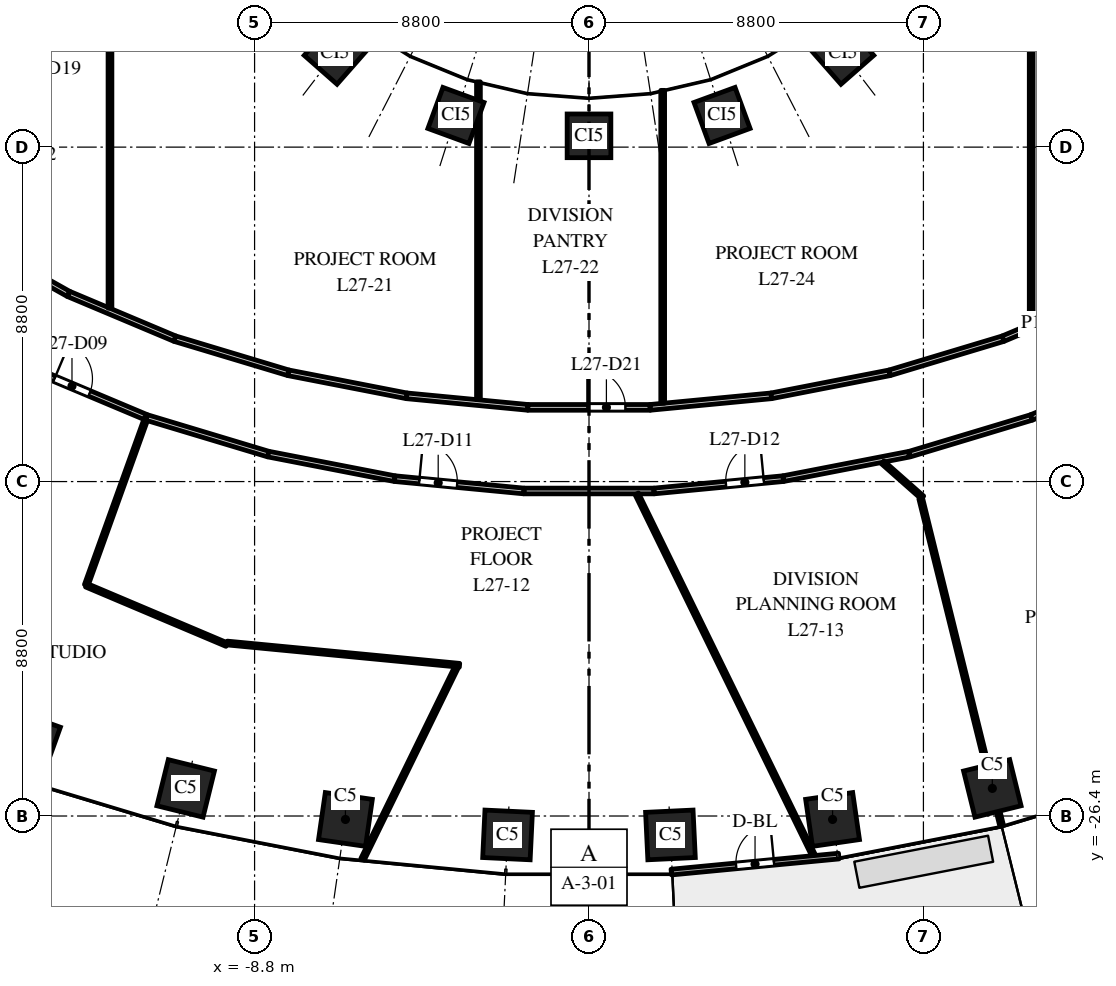
"""IFC4 building model, lengths in metres.
Left out: names, types, materials, properties, quantities, classifications, styles, units other than length and angle.
Written with IfcOpenShell. Run it as: python <this file> out.ifc"""

import sys

from ifc_helpers import new_model, si_unit, direction, frame, frame_2d, origin, origin_2d, place, context, subcontext, project, spatial, rectangle, extrude, element, fill, save


model = new_model("IFC4")
c1 = context("Model", 3, precision=1e-05, world=origin(), true_north=direction((0.0, 1.0)))
c2 = subcontext(c1, "Body", "Model", "MODEL_VIEW")
j1 = project(units=[si_unit("LENGTHUNIT", "METRE"), si_unit("PLANEANGLEUNIT", "RADIAN")], contexts=[c1])
p1 = place(None, origin())
s1 = spatial("IfcSite", under=j1, at=p1, CompositionType="ELEMENT")
p2 = place(p1, origin())
s2 = spatial("IfcBuilding", under=s1, at=p2, CompositionType="ELEMENT")
p3 = place(p2, frame((0.0, 0.0, 120.0)))
s3 = spatial("IfcBuildingStorey", under=s2, at=p3, CompositionType="ELEMENT", Elevation=120.0)
for number, where, z_axis, x_axis in (
    (1, (-14.709, -24.441, 0.0), (0.0, 0.0, 1.0), (0.941, -0.338, 0.0)),
    (2, (-10.613, -25.674, 0.0), (0.0, 0.0, 1.0), (0.971, -0.24, 0.0)),
    (3, (-6.409, -26.491, 0.0), (0.0, 0.0, 1.0), (0.99, -0.143, 0.0)),
    (4, (-2.143, -26.898, 0.0), (0.0, 0.0, 1.0), (0.999, -0.048, 0.0)),
    (5, (2.143, -26.898, 0.0), (0.0, 0.0, 1.0), (0.999, 0.048, 0.0)),
    (6, (6.409, -26.491, 0.0), (0.0, 0.0, 1.0), (0.99, 0.143, 0.0)),
    (7, (10.613, -25.674, 0.0), (0.0, 0.0, 1.0), (0.971, 0.24, 0.0)),
):
    element("IfcColumn", number, at=place(p3, frame(where, z_axis=z_axis, x_axis=x_axis)), inside=s3, PredefinedType="COLUMN", context=c2, shape_type="SweptSolid", body=[
        extrude(rectangle(XDim=1.25, YDim=1.25, at=origin_2d()), origin(), (0.0, 0.0, 1.0), 4.0),
    ])
for number, where, z_axis, x_axis in (
    (8, (-6.682, -6.334, 0.0), (0.0, 0.0, 1.0), (0.751, -0.66, 0.0)),
    (9, (-3.501, -7.967, 0.0), (0.0, 0.0, 1.0), (0.939, -0.344, 0.0)),
    (10, (0.0, -8.503, 0.0), (0.0, 0.0, 1.0), (1.0, 0.0, 0.0)),
    (11, (3.501, -7.967, 0.0), (0.0, 0.0, 1.0), (0.939, 0.344, 0.0)),
    (12, (6.682, -6.334, 0.0), (0.0, 0.0, 1.0), (0.751, 0.66, 0.0)),
):
    element("IfcColumn", number, at=place(p3, frame(where, z_axis=z_axis, x_axis=x_axis)), inside=s3, PredefinedType="COLUMN", context=c2, shape_type="SweptSolid", body=[
        extrude(rectangle(XDim=1.15, YDim=1.15, at=origin_2d()), origin(), (0.0, 0.0, 1.0), 4.0),
    ])
p4 = place(p3, frame((2.166, -27.875, 0.0), z_axis=(0.0, 0.0, 1.0), x_axis=(0.995473879823, 0.095035543824, 0.0)))
e13 = element("IfcWall", 13, at=p4, inside=s3, PredefinedType="STANDARD", context=c2, shape_type="SweptSolid", body=[
    extrude(rectangle(XDim=4.426, YDim=0.15, at=frame_2d((2.213, 0.0))), origin(), (0.0, 0.0, 1.0), 3.7),
])
p5 = place(p4, frame((1.713, 0.0, 0.0)))
e14 = element("IfcOpeningElement", 14, at=p5, cuts=e13, PredefinedType="OPENING", context=c2, shape_type="SweptSolid", body=[
    extrude(rectangle(XDim=1.0, YDim=2.4, at=frame_2d((0.5, 1.2))), frame((0.0, 0.085, 0.0), z_axis=(0.0, -1.0, 0.0), x_axis=(1.0, 0.0, 0.0)), (0.0, 0.0, 1.0), 0.17),
])
p6 = place(p3, frame((-16.25, -11.23, 0.0), z_axis=(0.0, 0.0, 1.0), x_axis=(0.872147381065, -0.489243237767, 0.0)))
e15 = element("IfcWall", 15, at=p6, inside=s3, PredefinedType="PARTITIONING", context=c2, shape_type="SweptSolid", body=[
    extrude(rectangle(XDim=2.927, YDim=0.15, at=frame_2d((1.464, 0.0))), origin(), (0.0, 0.0, 1.0), 2.75),
])
p7 = place(p3, frame((-14.665, -14.642, 0.0), z_axis=(0.0, 0.0, 1.0), x_axis=(0.921850993012, -0.387544509293, 0.0)))
e16 = element("IfcWall", 16, at=p7, inside=s3, PredefinedType="PARTITIONING", context=c2, shape_type="SweptSolid", body=[
    extrude(rectangle(XDim=3.259, YDim=0.15, at=frame_2d((1.629, 0.0))), origin(), (0.0, 0.0, 1.0), 2.85),
])
p8 = place(p7, frame((0.65, 0.0, 0.0)))
e17 = element("IfcOpeningElement", 17, at=p8, cuts=e16, PredefinedType="OPENING", context=c2, shape_type="SweptSolid", body=[
    extrude(rectangle(XDim=1.0, YDim=2.1, at=frame_2d((0.5, 1.05))), frame((0.0, 0.085, 0.0), z_axis=(0.0, -1.0, 0.0), x_axis=(1.0, 0.0, 0.0)), (0.0, 0.0, 1.0), 0.17),
])
p9 = place(p3, frame((-13.697, -12.662, 0.0), z_axis=(0.0, 0.0, 1.0), x_axis=(0.921751821358, -0.387780324183, 0.0)))
e18 = element("IfcWall", 18, at=p9, inside=s3, PredefinedType="PARTITIONING", context=c2, shape_type="SweptSolid", body=[
    extrude(rectangle(XDim=3.038, YDim=0.15, at=frame_2d((1.519, 0.0))), origin(), (0.0, 0.0, 1.0), 2.85),
])
p10 = place(p3, frame((-13.23, -20.327, 0.0), z_axis=(0.0, 0.0, 1.0), x_axis=(0.338411379185, 0.940998266969, 0.0)))
e19 = element("IfcWall", 19, at=p10, inside=s3, PredefinedType="PARTITIONING", context=c2, shape_type="SweptSolid", body=[
    extrude(rectangle(XDim=4.687, YDim=0.1, at=frame_2d((2.343, 0.0))), origin(), (0.0, 0.0, 1.0), 3.7),
])
p11 = place(p3, frame((-13.23, -20.327, 0.0), z_axis=(0.0, 0.0, 1.0), x_axis=(0.921068797825, -0.389399884017, 0.0)))
e20 = element("IfcWall", 20, at=p11, inside=s3, PredefinedType="PARTITIONING", context=c2, shape_type="SweptSolid", body=[
    extrude(rectangle(XDim=4.014, YDim=0.1, at=frame_2d((2.007, 0.0))), origin(), (0.0, 0.0, 1.0), 3.7),
])
p12 = place(p3, frame((-12.605, -13.036, 0.0), z_axis=(0.0, 0.0, 1.0), x_axis=(0.0, 1.0, 0.0)))
e21 = element("IfcWall", 21, at=p12, inside=s3, PredefinedType="PARTITIONING", context=c2, shape_type="SweptSolid", body=[
    extrude(rectangle(XDim=26.072, YDim=0.1, at=frame_2d((13.036, 0.0))), origin(), (0.0, 0.0, 1.0), 2.75),
])
p13 = place(p3, frame((-11.643, -15.913, 0.0), z_axis=(0.0, 0.0, 1.0), x_axis=(0.957584891346, -0.288151307243, 0.0)))
e22 = element("IfcWall", 22, at=p13, inside=s3, PredefinedType="PARTITIONING", context=c2, shape_type="SweptSolid", body=[
    extrude(rectangle(XDim=3.345, YDim=0.15, at=frame_2d((1.672, 0.0))), origin(), (0.0, 0.0, 1.0), 3.7),
])
p14 = place(p3, frame((-10.897, -13.84, 0.0), z_axis=(0.0, 0.0, 1.0), x_axis=(0.957606118849, -0.28808075455, 0.0)))
e23 = element("IfcWall", 23, at=p14, inside=s3, PredefinedType="PARTITIONING", context=c2, shape_type="SweptSolid", body=[
    extrude(rectangle(XDim=3.117, YDim=0.15, at=frame_2d((1.559, 0.0))), origin(), (0.0, 0.0, 1.0), 3.7),
])
p15 = place(p3, frame((-9.523, -21.848, 0.0), z_axis=(0.0, 0.0, 1.0), x_axis=(0.995438322378, -0.095407265659, 0.0)))
e24 = element("IfcWall", 24, at=p15, inside=s3, PredefinedType="PARTITIONING", context=c2, shape_type="SweptSolid", body=[
    extrude(rectangle(XDim=6.144, YDim=0.1, at=frame_2d((3.072, 0.0))), origin(), (0.0, 0.0, 1.0), 2.85),
])
p16 = place(p3, frame((-8.44, -16.877, 0.0), z_axis=(0.0, 0.0, 1.0), x_axis=(0.981665220565, -0.190613207134, 0.0)))
e25 = element("IfcWall", 25, at=p16, inside=s3, PredefinedType="PARTITIONING", context=c2, shape_type="SweptSolid", body=[
    extrude(rectangle(XDim=3.389, YDim=0.15, at=frame_2d((1.695, 0.0))), origin(), (0.0, 0.0, 1.0), 2.85),
])
p17 = place(p3, frame((-7.912, -14.738, 0.0), z_axis=(0.0, 0.0, 1.0), x_axis=(0.981588545092, -0.191007665145, 0.0)))
e26 = element("IfcWall", 26, at=p17, inside=s3, PredefinedType="PARTITIONING", context=c2, shape_type="SweptSolid", body=[
    extrude(rectangle(XDim=3.172, YDim=0.15, at=frame_2d((1.586, 0.0))), origin(), (0.0, 0.0, 1.0), 2.85),
])
p18 = place(p3, frame((-5.958, -27.538, 0.0), z_axis=(0.0, 0.0, 1.0), x_axis=(0.439326712168, 0.8983273568, 0.0)))
e27 = element("IfcWall", 27, at=p18, inside=s3, PredefinedType="PARTITIONING", context=c2, shape_type="SweptSolid", body=[
    extrude(rectangle(XDim=5.634, YDim=0.1, at=frame_2d((2.817, 0.0))), origin(), (0.0, 0.0, 1.0), 2.9),
])
p19 = place(p3, frame((-5.113, -17.523, 0.0), z_axis=(0.0, 0.0, 1.0), x_axis=(0.995466844572, -0.095109207532, 0.0)))
e28 = element("IfcWall", 28, at=p19, inside=s3, PredefinedType="PARTITIONING", context=c2, shape_type="SweptSolid", body=[
    extrude(rectangle(XDim=3.417, YDim=0.15, at=frame_2d((1.708, 0.0))), origin(), (0.0, 0.0, 1.0), 3.7),
])
p20 = place(p19, frame((0.65, 0.0, 0.0)))
e29 = element("IfcOpeningElement", 29, at=p20, cuts=e28, PredefinedType="OPENING", context=c2, shape_type="SweptSolid", body=[
    extrude(rectangle(XDim=1.0, YDim=2.1, at=frame_2d((0.5, 1.05))), frame((0.0, 0.085, 0.0), z_axis=(0.0, -1.0, 0.0), x_axis=(1.0, 0.0, 0.0)), (0.0, 0.0, 1.0), 0.17),
])
p21 = place(p3, frame((-4.798, -15.344, 0.0), z_axis=(0.0, 0.0, 1.0), x_axis=(0.995491705426, -0.09484863957, 0.0)))
e30 = element("IfcWall", 30, at=p21, inside=s3, PredefinedType="PARTITIONING", context=c2, shape_type="SweptSolid", body=[
    extrude(rectangle(XDim=3.205, YDim=0.15, at=frame_2d((1.602, 0.0))), origin(), (0.0, 0.0, 1.0), 3.7),
])
p22 = place(p3, frame((-2.909, -15.445, 0.0), z_axis=(0.0, 0.0, 1.0), x_axis=(0.0, 1.0, 0.0)))
e31 = element("IfcWall", 31, at=p22, inside=s3, PredefinedType="PARTITIONING", context=c2, shape_type="SweptSolid", body=[
    extrude(rectangle(XDim=8.363, YDim=0.1, at=frame_2d((4.182, 0.0))), origin(), (0.0, 0.0, 1.0), 2.9),
])
p23 = place(p3, frame((-1.712, -17.848, 0.0), z_axis=(0.0, 0.0, 1.0), x_axis=(1.0, 0.0, 0.0)))
e32 = element("IfcWall", 32, at=p23, inside=s3, PredefinedType="PARTITIONING", context=c2, shape_type="SweptSolid", body=[
    extrude(rectangle(XDim=3.424, YDim=0.15, at=frame_2d((1.712, 0.0))), origin(), (0.0, 0.0, 1.0), 2.85),
])
p24 = place(p3, frame((-1.608, -15.648, 0.0), z_axis=(0.0, 0.0, 1.0), x_axis=(1.0, 0.0, 0.0)))
e33 = element("IfcWall", 33, at=p24, inside=s3, PredefinedType="PARTITIONING", context=c2, shape_type="SweptSolid", body=[
    extrude(rectangle(XDim=3.216, YDim=0.15, at=frame_2d((1.608, 0.0))), origin(), (0.0, 0.0, 1.0), 2.85),
])
p25 = place(p24, frame((1.566, 0.0, 0.0)))
e34 = element("IfcOpeningElement", 34, at=p25, cuts=e33, PredefinedType="OPENING", context=c2, shape_type="SweptSolid", body=[
    extrude(rectangle(XDim=1.0, YDim=2.1, at=frame_2d((0.5, 1.05))), frame((0.0, 0.085, 0.0), z_axis=(0.0, -1.0, 0.0), x_axis=(1.0, 0.0, 0.0)), (0.0, 0.0, 1.0), 0.17),
])
p26 = place(p3, frame((1.257, -17.923, 0.0), z_axis=(0.0, 0.0, 1.0), x_axis=(0.439339826825, -0.898320942963, 0.0)))
e35 = element("IfcWall", 35, at=p26, inside=s3, PredefinedType="PARTITIONING", context=c2, shape_type="SweptSolid", body=[
    extrude(rectangle(XDim=10.702, YDim=0.1, at=frame_2d((5.351, 0.0))), origin(), (0.0, 0.0, 1.0), 2.9),
])
p27 = place(p3, frame((1.608, -15.648, 0.0), z_axis=(0.0, 0.0, 1.0), x_axis=(0.995491705426, 0.09484863957, 0.0)))
e36 = element("IfcWall", 36, at=p27, inside=s3, PredefinedType="PARTITIONING", context=c2, shape_type="SweptSolid", body=[
    extrude(rectangle(XDim=3.205, YDim=0.15, at=frame_2d((1.602, 0.0))), origin(), (0.0, 0.0, 1.0), 2.85),
])
p28 = place(p3, frame((1.712, -17.848, 0.0), z_axis=(0.0, 0.0, 1.0), x_axis=(0.995466844572, 0.095109207532, 0.0)))
e37 = element("IfcWall", 37, at=p28, inside=s3, PredefinedType="PARTITIONING", context=c2, shape_type="SweptSolid", body=[
    extrude(rectangle(XDim=3.417, YDim=0.15, at=frame_2d((1.708, 0.0))), origin(), (0.0, 0.0, 1.0), 2.85),
])
p29 = place(p28, frame((1.9, 0.0, 0.0)))
e38 = element("IfcOpeningElement", 38, at=p29, cuts=e37, PredefinedType="OPENING", context=c2, shape_type="SweptSolid", body=[
    extrude(rectangle(XDim=1.0, YDim=2.1, at=frame_2d((0.5, 1.05))), frame((0.0, 0.085, 0.0), z_axis=(0.0, -1.0, 0.0), x_axis=(1.0, 0.0, 0.0)), (0.0, 0.0, 1.0), 0.17),
])
p30 = place(p3, frame((1.939, -15.537, 0.0), z_axis=(0.0, 0.0, 1.0), x_axis=(0.0, 1.0, 0.0)))
e39 = element("IfcWall", 39, at=p30, inside=s3, PredefinedType="PARTITIONING", context=c2, shape_type="SweptSolid", body=[
    extrude(rectangle(XDim=8.23, YDim=0.1, at=frame_2d((4.115, 0.0))), origin(), (0.0, 0.0, 1.0), 2.85),
])
p31 = place(p3, frame((4.798, -15.344, 0.0), z_axis=(0.0, 0.0, 1.0), x_axis=(0.981588545092, 0.191007665145, 0.0)))
e40 = element("IfcWall", 40, at=p31, inside=s3, PredefinedType="PARTITIONING", context=c2, shape_type="SweptSolid", body=[
    extrude(rectangle(XDim=3.172, YDim=0.15, at=frame_2d((1.586, 0.0))), origin(), (0.0, 0.0, 1.0), 3.7),
])
p32 = place(p3, frame((5.113, -17.523, 0.0), z_axis=(0.0, 0.0, 1.0), x_axis=(0.981690354374, 0.19048372143, 0.0)))
e41 = element("IfcWall", 41, at=p32, inside=s3, PredefinedType="PARTITIONING", context=c2, shape_type="SweptSolid", body=[
    extrude(rectangle(XDim=3.37, YDim=0.15, at=frame_2d((1.685, 0.0))), origin(), (0.0, 0.0, 1.0), 3.7),
])
p33 = place(p3, frame((7.728, -17.095, 0.0), z_axis=(0.0, 0.0, 1.0), x_axis=(0.749403770292, -0.662113275106, 0.0)))
e42 = element("IfcWall", 42, at=p33, inside=s3, PredefinedType="PARTITIONING", context=c2, shape_type="SweptSolid", body=[
    extrude(rectangle(XDim=1.396, YDim=0.1, at=frame_2d((0.698, 0.0))), origin(), (0.0, 0.0, 1.0), 3.7),
])
p34 = place(p3, frame((7.912, -14.738, 0.0), z_axis=(0.0, 0.0, 1.0), x_axis=(0.957606118849, 0.28808075455, 0.0)))
e43 = element("IfcWall", 43, at=p34, inside=s3, PredefinedType="PARTITIONING", context=c2, shape_type="SweptSolid", body=[
    extrude(rectangle(XDim=3.117, YDim=0.15, at=frame_2d((1.559, 0.0))), origin(), (0.0, 0.0, 1.0), 2.85),
])
p35 = place(p3, frame((8.44, -16.877, 0.0), z_axis=(0.0, 0.0, 1.0), x_axis=(0.957584891346, 0.288151307243, 0.0)))
e44 = element("IfcWall", 44, at=p35, inside=s3, PredefinedType="PARTITIONING", context=c2, shape_type="SweptSolid", body=[
    extrude(rectangle(XDim=3.345, YDim=0.15, at=frame_2d((1.672, 0.0))), origin(), (0.0, 0.0, 1.0), 2.85),
])
p36 = place(p3, frame((8.729, -18.046, 0.0), z_axis=(0.0, 0.0, 1.0), x_axis=(0.240109518445, -0.970745805632, 0.0)))
e45 = element("IfcWall", 45, at=p36, inside=s3, PredefinedType="PARTITIONING", context=c2, shape_type="SweptSolid", body=[
    extrude(rectangle(XDim=8.858, YDim=0.1, at=frame_2d((4.429, 0.0))), origin(), (0.0, 0.0, 1.0), 2.9),
])
p37 = place(p3, frame((10.897, -13.84, 0.0), z_axis=(0.0, 0.0, 1.0), x_axis=(0.921751821358, 0.387780324183, 0.0)))
e46 = element("IfcWall", 46, at=p37, inside=s3, PredefinedType="PARTITIONING", context=c2, shape_type="SweptSolid", body=[
    extrude(rectangle(XDim=3.038, YDim=0.15, at=frame_2d((1.519, 0.0))), origin(), (0.0, 0.0, 1.0), 3.7),
])
p38 = place(p3, frame((11.636, -13.444, 0.0), z_axis=(0.0, 0.0, 1.0), x_axis=(0.0, 1.0, 0.0)))
e47 = element("IfcWall", 47, at=p38, inside=s3, PredefinedType="PARTITIONING", context=c2, shape_type="SweptSolid", body=[
    extrude(rectangle(XDim=26.888, YDim=0.1, at=frame_2d((13.444, 0.0))), origin(), (0.0, 0.0, 1.0), 2.75),
])
p39 = place(p3, frame((11.643, -15.913, 0.0), z_axis=(0.0, 0.0, 1.0), x_axis=(0.921789499058, 0.38769075231, 0.0)))
e48 = element("IfcWall", 48, at=p39, inside=s3, PredefinedType="PARTITIONING", context=c2, shape_type="SweptSolid", body=[
    extrude(rectangle(XDim=3.278, YDim=0.15, at=frame_2d((1.639, 0.0))), origin(), (0.0, 0.0, 1.0), 3.7),
])
p40 = place(p39, frame((1.65, 0.0, 0.0)))
e49 = element("IfcOpeningElement", 49, at=p40, cuts=e48, PredefinedType="OPENING", context=c2, shape_type="SweptSolid", body=[
    extrude(rectangle(XDim=1.0, YDim=2.1, at=frame_2d((0.5, 1.05))), frame((0.0, 0.085, 0.0), z_axis=(0.0, -1.0, 0.0), x_axis=(1.0, 0.0, 0.0)), (0.0, 0.0, 1.0), 0.17),
])
p41 = place(p5, origin())
e50 = element("IfcDoor", 50, at=p41, inside=s3, OperationType="SINGLE_SWING_RIGHT", PredefinedType="DOOR", context=c2, shape_type="SweptSolid", body=[
    extrude(rectangle(XDim=1.0, YDim=2.4, at=frame_2d((0.5, 1.2))), frame((0.0, 0.025, 0.0), z_axis=(0.0, -1.0, 0.0), x_axis=(1.0, 0.0, 0.0)), (0.0, 0.0, 1.0), 0.05),
])
fill(e14, e50)
p42 = place(p8, origin())
e51 = element("IfcDoor", 51, at=p42, inside=s3, OperationType="SINGLE_SWING_LEFT", PredefinedType="DOOR", context=c2, shape_type="SweptSolid", body=[
    extrude(rectangle(XDim=1.0, YDim=2.1, at=frame_2d((0.5, 1.05))), frame((0.0, 0.025, 0.0), z_axis=(0.0, -1.0, 0.0), x_axis=(1.0, 0.0, 0.0)), (0.0, 0.0, 1.0), 0.05),
])
fill(e17, e51)
p43 = place(p20, origin())
e52 = element("IfcDoor", 52, at=p43, inside=s3, OperationType="SINGLE_SWING_LEFT", PredefinedType="DOOR", context=c2, shape_type="SweptSolid", body=[
    extrude(rectangle(XDim=1.0, YDim=2.1, at=frame_2d((0.5, 1.05))), frame((0.0, 0.025, 0.0), z_axis=(0.0, -1.0, 0.0), x_axis=(1.0, 0.0, 0.0)), (0.0, 0.0, 1.0), 0.05),
])
fill(e29, e52)
p44 = place(p29, origin())
e53 = element("IfcDoor", 53, at=p44, inside=s3, OperationType="SINGLE_SWING_RIGHT", PredefinedType="DOOR", context=c2, shape_type="SweptSolid", body=[
    extrude(rectangle(XDim=1.0, YDim=2.1, at=frame_2d((0.5, 1.05))), frame((0.0, 0.025, 0.0), z_axis=(0.0, -1.0, 0.0), x_axis=(1.0, 0.0, 0.0)), (0.0, 0.0, 1.0), 0.05),
])
fill(e38, e53)
p45 = place(p25, origin())
e54 = element("IfcDoor", 54, at=p45, inside=s3, OperationType="SINGLE_SWING_LEFT", PredefinedType="DOOR", context=c2, shape_type="SweptSolid", body=[
    extrude(rectangle(XDim=1.0, YDim=2.1, at=frame_2d((0.5, 1.05))), frame((0.0, 0.025, 0.0), z_axis=(0.0, -1.0, 0.0), x_axis=(1.0, 0.0, 0.0)), (0.0, 0.0, 1.0), 0.05),
])
fill(e34, e54)
save(model, sys.argv[1])
